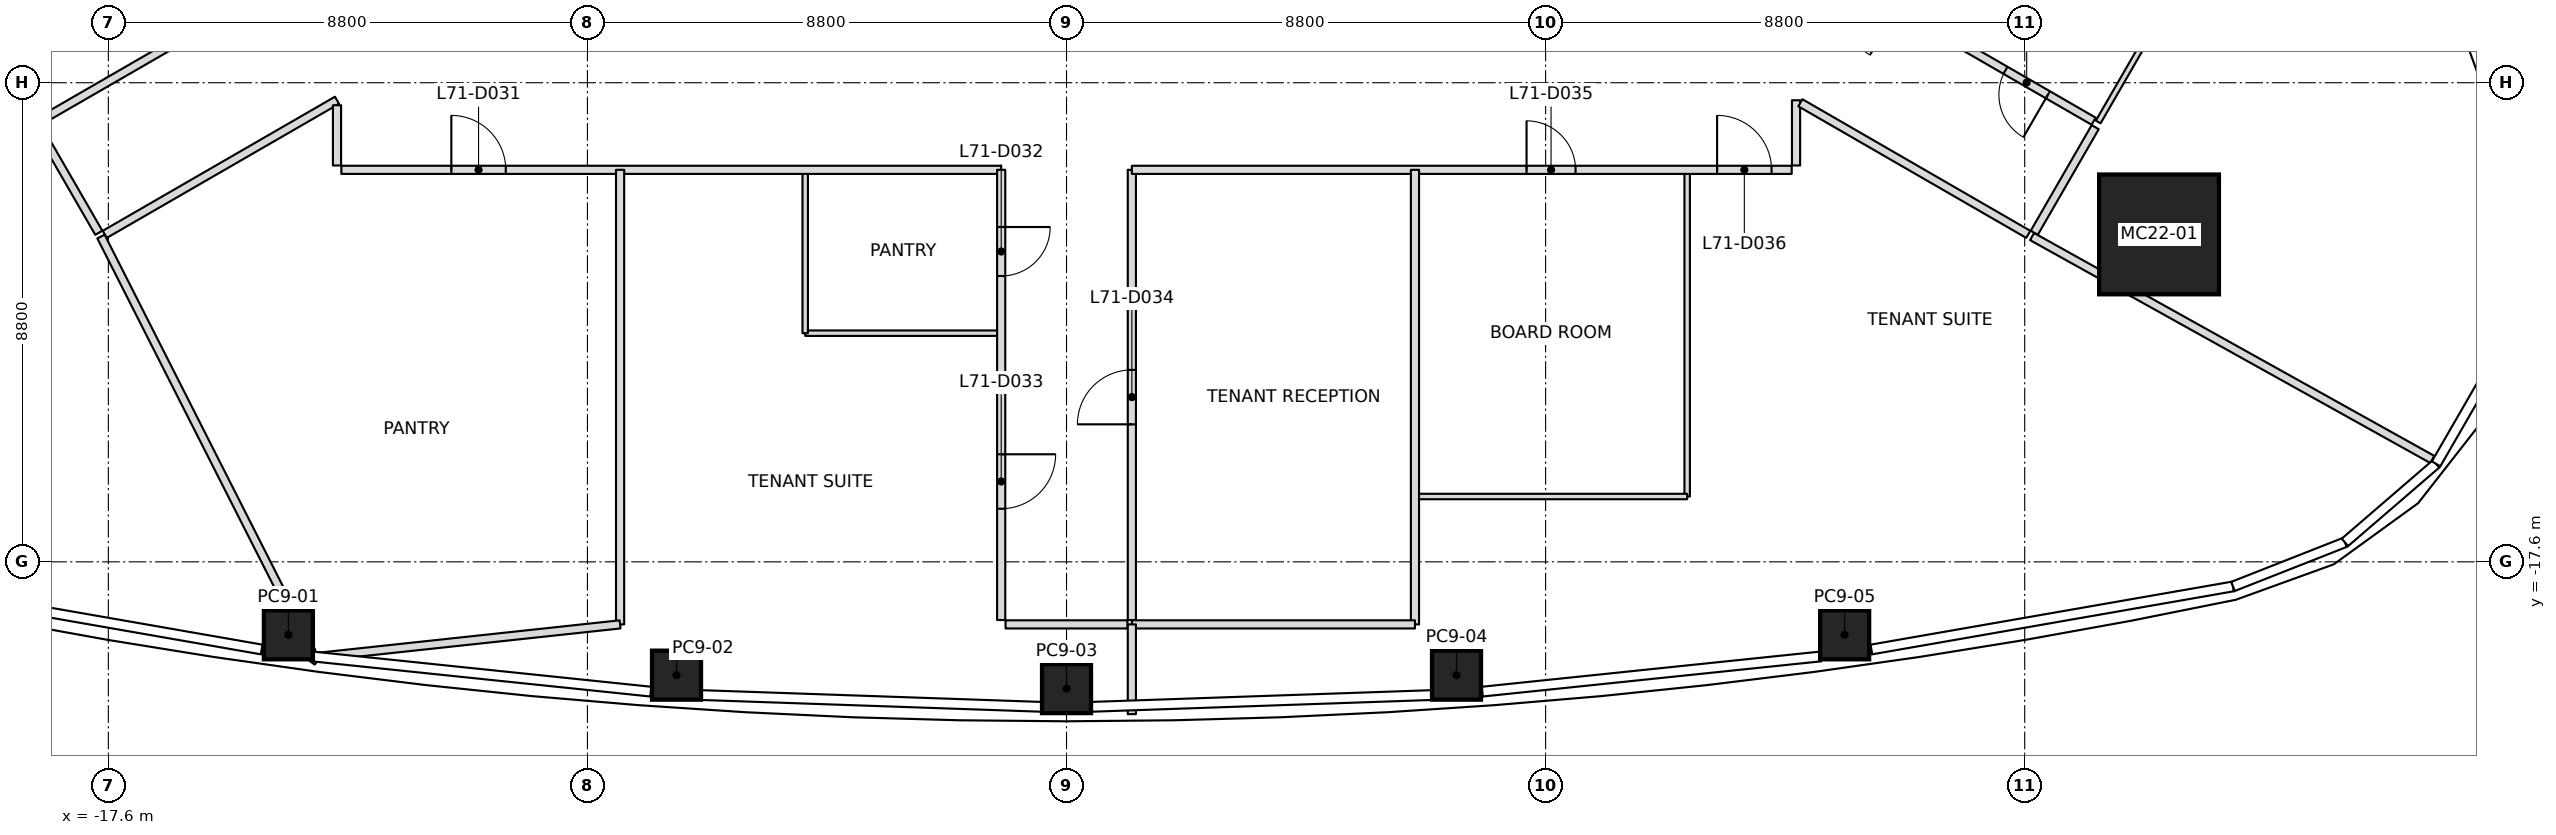
"""IFC4 building model, lengths in metres.
Left out: names, types, materials, properties, quantities, classifications, styles, units other than length and angle.
Written with IfcOpenShell. Run it as: python <this file> out.ifc"""

import sys

from ifc_helpers import new_model, si_unit, direction, frame, frame_2d, origin, origin_2d, place, context, subcontext, project, spatial, rectangle, extrude, element, fill, save


model = new_model("IFC4")
c1 = context("Model", 3, precision=1e-05, world=origin(), true_north=direction((0.0, 1.0)))
c2 = subcontext(c1, "Body", "Model", "MODEL_VIEW")
j1 = project(units=[si_unit("LENGTHUNIT", "METRE"), si_unit("PLANEANGLEUNIT", "RADIAN")], contexts=[c1])
p1 = place(None, origin())
s1 = spatial("IfcSite", under=j1, at=p1, CompositionType="ELEMENT")
p2 = place(p1, origin())
s2 = spatial("IfcBuilding", under=s1, at=p2, CompositionType="ELEMENT")
p3 = place(p2, frame((0.0, 0.0, 311.0)))
s3 = spatial("IfcBuildingStorey", under=s2, at=p3, CompositionType="ELEMENT", Elevation=311.0)
p4 = place(p3, frame((20.067, -11.586, 0.0), z_axis=(-0.027695790401, 0.015983033227, 0.999488612163), x_axis=(0.999616398022, 0.00044283261, 0.027692249912)))
e1 = element("IfcColumn", 1, at=p4, inside=s3, PredefinedType="COLUMN", context=c2, shape_type="SweptSolid", body=[
    extrude(rectangle(XDim=2.2, YDim=2.2, at=origin_2d()), origin(), (0.0, 0.0, 1.0), 4.002),
])
p5 = place(p3, frame((-14.293, -18.94, 0.0), z_axis=(0.017391452496, 0.010373848857, 0.999794939295), x_axis=(-0.990333494327, 0.137804297065, 0.01579701632)))
e2 = element("IfcColumn", 2, at=p5, inside=s3, PredefinedType="COLUMN", context=c2, shape_type="SweptSolid", body=[
    extrude(rectangle(XDim=0.9, YDim=0.9, at=origin_2d()), origin(), (0.0, 0.0, 1.0), 4.001),
])
p6 = place(p3, frame((-7.164, -19.681, 0.0), z_axis=(0.008727156526, 0.011107290124, 0.999900227445), x_axis=(-0.997580055995, 0.069072384326, 0.00793962244)))
e3 = element("IfcColumn", 3, at=p6, inside=s3, PredefinedType="COLUMN", context=c2, shape_type="SweptSolid", body=[
    extrude(rectangle(XDim=0.9, YDim=0.9, at=origin_2d()), origin(), (0.0, 0.0, 1.0), 4.0),
])
p7 = place(p3, frame((0.0, -19.929, 0.0), z_axis=(0.0, 0.011473854038, 0.99993417317), x_axis=(1.0, 0.0, 0.0)))
e4 = element("IfcColumn", 4, at=p7, inside=s3, PredefinedType="COLUMN", context=c2, shape_type="SweptSolid", body=[
    extrude(rectangle(XDim=0.9, YDim=0.9, at=origin_2d()), origin(), (0.0, 0.0, 1.0), 4.0),
])
p8 = place(p3, frame((7.164, -19.681, 0.0), z_axis=(-0.008727156526, 0.011107290124, 0.999900227445), x_axis=(0.997580055995, 0.069072384326, 0.00793962244)))
e5 = element("IfcColumn", 5, at=p8, inside=s3, PredefinedType="COLUMN", context=c2, shape_type="SweptSolid", body=[
    extrude(rectangle(XDim=0.9, YDim=0.9, at=origin_2d()), origin(), (0.0, 0.0, 1.0), 4.0),
])
p9 = place(p3, frame((14.293, -18.94, 0.0), z_axis=(-0.017391452496, 0.010373848857, 0.999794939295), x_axis=(0.990333494327, 0.137804297065, 0.01579701632)))
e6 = element("IfcColumn", 6, at=p9, inside=s3, PredefinedType="COLUMN", context=c2, shape_type="SweptSolid", body=[
    extrude(rectangle(XDim=0.9, YDim=0.9, at=origin_2d()), origin(), (0.0, 0.0, 1.0), 4.001),
])
p10 = place(p3, frame((-17.735, -11.625, 0.0), z_axis=(0.0, 0.0, 1.0), x_axis=(0.452377124292, -0.891826741815, 0.0)))
e7 = element("IfcWall", 7, at=p10, inside=s3, PredefinedType="PARTITIONING", context=c2, shape_type="SweptSolid", body=[
    extrude(rectangle(XDim=8.555, YDim=0.15, at=frame_2d((4.278, 0.0))), origin(), (0.0, 0.0, 1.0), 3.45),
])
p11 = place(p3, frame((-8.2, -10.4, 0.0), z_axis=(0.0, 0.0, 1.0), x_axis=(0.0, -1.0, 0.0)))
e8 = element("IfcWall", 8, at=p11, inside=s3, PredefinedType="PARTITIONING", context=c2, shape_type="SweptSolid", body=[
    extrude(rectangle(XDim=8.349, YDim=0.15, at=frame_2d((4.174, 0.0))), origin(), (0.0, 0.0, 1.0), 3.45),
])
p12 = place(p3, frame((-8.2, -18.749, 0.0), z_axis=(0.0, 0.0, 1.0), x_axis=(-0.994268787809, -0.106909202549, 0.0)))
e9 = element("IfcWall", 9, at=p12, inside=s3, PredefinedType="PARTITIONING", context=c2, shape_type="SweptSolid", body=[
    extrude(rectangle(XDim=5.547, YDim=0.15, at=frame_2d((2.773, 0.0))), origin(), (0.0, 0.0, 1.0), 3.234),
])
p13 = place(p3, frame((-13.765, -19.428, 0.0), z_axis=(0.0, 0.0, 1.0), x_axis=(-0.803180127116, 0.595736253225, 0.0)))
e10 = element("IfcWall", 10, at=p13, inside=s3, PredefinedType="PARTITIONING", context=c2, shape_type="SweptSolid", body=[
    extrude(rectangle(XDim=0.184, YDim=0.15, at=frame_2d((0.092, 0.0))), origin(), (0.0, 0.0, 1.0), 3.45),
])
p14 = place(p3, frame((6.4, -10.4, 0.0), z_axis=(0.0, 0.0, 1.0), x_axis=(0.0, -1.0, 0.0)))
e11 = element("IfcWall", 11, at=p14, inside=s3, PredefinedType="PARTITIONING", context=c2, shape_type="SweptSolid", body=[
    extrude(rectangle(XDim=8.349, YDim=0.15, at=frame_2d((4.174, 0.0))), origin(), (0.0, 0.0, 1.0), 3.45),
])
p15 = place(p3, frame((6.4, -18.749, 0.0), z_axis=(0.0, 0.0, 1.0), x_axis=(-1.0, 0.0, 0.0)))
e12 = element("IfcWall", 12, at=p15, inside=s3, PredefinedType="PARTITIONING", context=c2, shape_type="SweptSolid", body=[
    extrude(rectangle(XDim=5.2, YDim=0.15, at=frame_2d((2.6, 0.0))), origin(), (0.0, 0.0, 1.0), 3.393),
])
p16 = place(p3, frame((1.2, -18.749, 0.0), z_axis=(0.0, 0.0, 1.0), x_axis=(0.0, -1.0, 0.0)))
e13 = element("IfcWall", 13, at=p16, inside=s3, PredefinedType="PARTITIONING", context=c2, shape_type="SweptSolid", body=[
    extrude(rectangle(XDim=1.649, YDim=0.15, at=frame_2d((0.824, 0.0))), origin(), (0.0, 0.0, 1.0), 3.234),
])
p17 = place(p3, frame((17.735, -11.625, 0.0), z_axis=(0.0, 0.0, 1.0), x_axis=(0.873657303836, -0.486541792094, 0.0)))
e14 = element("IfcWall", 14, at=p17, inside=s3, PredefinedType="PARTITIONING", context=c2, shape_type="SweptSolid", body=[
    extrude(rectangle(XDim=8.415, YDim=0.15, at=frame_2d((4.208, 0.0))), origin(), (0.0, 0.0, 1.0), 3.234),
])
p18 = place(p3, frame((-18.896, -9.616, 0.0), z_axis=(0.0, 0.0, 1.0), x_axis=(0.500030632641, -0.866007717299, 0.0)))
e15 = element("IfcWall", 15, at=p18, inside=s3, PredefinedType="PARTITIONING", context=c2, shape_type="SweptSolid", body=[
    extrude(rectangle(XDim=2.24, YDim=0.15, at=frame_2d((1.12, 0.0))), origin(), (0.0, 0.0, 1.0), 3.233),
])
p19 = place(p3, frame((-13.4, -6.351, 0.0), z_axis=(0.0, 0.0, 1.0), x_axis=(-0.866040017224, -0.499974687925, 0.0)))
e16 = element("IfcWall", 16, at=p19, inside=s3, PredefinedType="PARTITIONING", context=c2, shape_type="SweptSolid", body=[
    extrude(rectangle(XDim=6.312, YDim=0.15, at=frame_2d((3.156, 0.0))), origin(), (0.0, 0.0, 1.0), 3.317),
])
p20 = place(p3, frame((-17.666, -11.585, 0.0), z_axis=(0.0, 0.0, 1.0), x_axis=(0.86601721881, 0.500014176524, 0.0)))
e17 = element("IfcWall", 17, at=p20, inside=s3, PredefinedType="PARTITIONING", context=c2, shape_type="SweptSolid", body=[
    extrude(rectangle(XDim=4.926, YDim=0.15, at=frame_2d((2.463, 0.0))), origin(), (0.0, 0.0, 1.0), 3.233),
])
p21 = place(p3, frame((-13.4, -9.214, 0.0), z_axis=(0.0, 0.0, 1.0), x_axis=(0.0, -1.0, 0.0)))
e18 = element("IfcWall", 18, at=p21, inside=s3, PredefinedType="PARTITIONING", context=c2, shape_type="SweptSolid", body=[
    extrude(rectangle(XDim=1.106, YDim=0.15, at=frame_2d((0.553, 0.0))), origin(), (0.0, 0.0, 1.0), 3.233),
])
p22 = place(p3, frame((-13.32, -10.4, 0.0), z_axis=(0.0, 0.0, 1.0), x_axis=(1.0, 0.0, 0.0)))
e19 = element("IfcWall", 19, at=p22, inside=s3, PredefinedType="PARTITIONING", context=c2, shape_type="SweptSolid", body=[
    extrude(rectangle(XDim=12.12, YDim=0.15, at=frame_2d((6.06, 0.0))), origin(), (0.0, 0.0, 1.0), 3.393),
])
p23 = place(p22, frame((2.02, 0.0, 0.0)))
e20 = element("IfcOpeningElement", 20, at=p23, cuts=e19, PredefinedType="OPENING", context=c2, shape_type="SweptSolid", body=[
    extrude(rectangle(XDim=1.0, YDim=2.1, at=frame_2d((0.5, 1.05))), frame((0.0, 0.075, 0.0), z_axis=(0.0, -1.0, 0.0), x_axis=(1.0, 0.0, 0.0)), (0.0, 0.0, 1.0), 0.15),
])
p24 = place(p3, frame((-1.2, -10.4, 0.0), z_axis=(0.0, 0.0, 1.0), x_axis=(0.0, -1.0, 0.0)))
e21 = element("IfcWall", 21, at=p24, inside=s3, PredefinedType="PARTITIONING", context=c2, shape_type="SweptSolid", body=[
    extrude(rectangle(XDim=8.269, YDim=0.15, at=frame_2d((4.134, 0.0))), origin(), (0.0, 0.0, 1.0), 3.45),
])
p25 = place(p24, frame((1.05, 0.0, 0.0)))
e22 = element("IfcOpeningElement", 22, at=p25, cuts=e21, PredefinedType="OPENING", context=c2, shape_type="SweptSolid", body=[
    extrude(rectangle(XDim=0.9, YDim=2.1, at=frame_2d((0.45, 1.05))), frame((0.0, 0.075, 0.0), z_axis=(0.0, -1.0, 0.0), x_axis=(1.0, 0.0, 0.0)), (0.0, 0.0, 1.0), 0.15),
])
p26 = place(p24, frame((5.224, 0.0, 0.0)))
e23 = element("IfcOpeningElement", 23, at=p26, cuts=e21, PredefinedType="OPENING", context=c2, shape_type="SweptSolid", body=[
    extrude(rectangle(XDim=1.0, YDim=2.1, at=frame_2d((0.5, 1.05))), frame((0.0, 0.075, 0.0), z_axis=(0.0, -1.0, 0.0), x_axis=(1.0, 0.0, 0.0)), (0.0, 0.0, 1.0), 0.15),
])
p27 = place(p3, frame((-1.12, -18.749, 0.0), z_axis=(0.0, 0.0, 1.0), x_axis=(1.0, 0.0, 0.0)))
e24 = element("IfcWall", 24, at=p27, inside=s3, PredefinedType="PARTITIONING", context=c2, shape_type="SweptSolid", body=[
    extrude(rectangle(XDim=2.24, YDim=0.15, at=frame_2d((1.12, 0.0))), origin(), (0.0, 0.0, 1.0), 3.45),
])
p28 = place(p3, frame((1.2, -18.669, 0.0), z_axis=(0.0, 0.0, 1.0), x_axis=(0.0, 1.0, 0.0)))
e25 = element("IfcWall", 25, at=p28, inside=s3, PredefinedType="PARTITIONING", context=c2, shape_type="SweptSolid", body=[
    extrude(rectangle(XDim=8.269, YDim=0.15, at=frame_2d((4.134, 0.0))), origin(), (0.0, 0.0, 1.0), 3.45),
])
p29 = place(p28, frame((3.594, 0.0, 0.0)))
e26 = element("IfcOpeningElement", 26, at=p29, cuts=e25, PredefinedType="OPENING", context=c2, shape_type="SweptSolid", body=[
    extrude(rectangle(XDim=1.0, YDim=2.1, at=frame_2d((0.5, 1.05))), frame((0.0, 0.075, 0.0), z_axis=(0.0, -1.0, 0.0), x_axis=(1.0, 0.0, 0.0)), (0.0, 0.0, 1.0), 0.15),
])
p30 = place(p3, frame((1.2, -10.4, 0.0), z_axis=(0.0, 0.0, 1.0), x_axis=(1.0, 0.0, 0.0)))
e27 = element("IfcWall", 27, at=p30, inside=s3, PredefinedType="PARTITIONING", context=c2, shape_type="SweptSolid", body=[
    extrude(rectangle(XDim=12.12, YDim=0.15, at=frame_2d((6.06, 0.0))), origin(), (0.0, 0.0, 1.0), 3.393),
])
p31 = place(p30, frame((7.25, 0.0, 0.0)))
e28 = element("IfcOpeningElement", 28, at=p31, cuts=e27, PredefinedType="OPENING", context=c2, shape_type="SweptSolid", body=[
    extrude(rectangle(XDim=0.9, YDim=2.1, at=frame_2d((0.45, 1.05))), frame((0.0, 0.075, 0.0), z_axis=(0.0, -1.0, 0.0), x_axis=(1.0, 0.0, 0.0)), (0.0, 0.0, 1.0), 0.15),
])
p32 = place(p30, frame((10.75, 0.0, 0.0)))
e29 = element("IfcOpeningElement", 29, at=p32, cuts=e27, PredefinedType="OPENING", context=c2, shape_type="SweptSolid", body=[
    extrude(rectangle(XDim=1.0, YDim=2.1, at=frame_2d((0.5, 1.05))), frame((0.0, 0.075, 0.0), z_axis=(0.0, -1.0, 0.0), x_axis=(1.0, 0.0, 0.0)), (0.0, 0.0, 1.0), 0.15),
])
p33 = place(p3, frame((13.4, -10.32, 0.0), z_axis=(0.0, 0.0, 1.0), x_axis=(0.0, 1.0, 0.0)))
e30 = element("IfcWall", 30, at=p33, inside=s3, PredefinedType="PARTITIONING", context=c2, shape_type="SweptSolid", body=[
    extrude(rectangle(XDim=1.198, YDim=0.15, at=frame_2d((0.599, 0.0))), origin(), (0.0, 0.0, 1.0), 3.233),
])
p34 = place(p3, frame((13.479, -9.168, 0.0), z_axis=(0.0, 0.0, 1.0), x_axis=(0.866024961331, -0.50000076635, 0.0)))
e31 = element("IfcWall", 31, at=p34, inside=s3, PredefinedType="PARTITIONING", context=c2, shape_type="SweptSolid", body=[
    extrude(rectangle(XDim=4.834, YDim=0.15, at=frame_2d((2.417, 0.0))), origin(), (0.0, 0.0, 1.0), 3.233),
])
p35 = place(p3, frame((18.866, -9.507, 0.0), z_axis=(0.0, 0.0, 1.0), x_axis=(-0.866040017224, 0.499974687925, 0.0)))
e32 = element("IfcWall", 32, at=p35, inside=s3, PredefinedType="PARTITIONING", context=c2, shape_type="SweptSolid", body=[
    extrude(rectangle(XDim=6.312, YDim=0.15, at=frame_2d((3.156, 0.0))), origin(), (0.0, 0.0, 1.0), 3.317),
])
p36 = place(p35, frame((0.97, 0.0, 0.0)))
e33 = element("IfcOpeningElement", 33, at=p36, cuts=e32, PredefinedType="OPENING", context=c2, shape_type="SweptSolid", body=[
    extrude(rectangle(XDim=0.9, YDim=2.1, at=frame_2d((0.45, 1.05))), frame((0.0, 0.075, 0.0), z_axis=(0.0, -1.0, 0.0), x_axis=(1.0, 0.0, 0.0)), (0.0, 0.0, 1.0), 0.15),
])
p37 = place(p35, frame((4.166, 0.0, 0.0)))
e34 = element("IfcOpeningElement", 34, at=p37, cuts=e32, PredefinedType="OPENING", context=c2, shape_type="SweptSolid", body=[
    extrude(rectangle(XDim=1.0, YDim=2.1, at=frame_2d((0.5, 1.05))), frame((0.0, 0.075, 0.0), z_axis=(0.0, -1.0, 0.0), x_axis=(1.0, 0.0, 0.0)), (0.0, 0.0, 1.0), 0.15),
])
p38 = place(p3, frame((17.775, -11.556, 0.0), z_axis=(0.0, 0.0, 1.0), x_axis=(0.500030632641, 0.866007717299, 0.0)))
e35 = element("IfcWall", 35, at=p38, inside=s3, PredefinedType="PARTITIONING", context=c2, shape_type="SweptSolid", body=[
    extrude(rectangle(XDim=2.24, YDim=0.15, at=frame_2d((1.12, 0.0))), origin(), (0.0, 0.0, 1.0), 3.233),
])
p39 = place(p3, frame((-1.23, -13.4, 0.0), z_axis=(0.0, 0.0, 1.0), x_axis=(-1.0, 0.0, 0.0)))
e36 = element("IfcWall", 36, at=p39, inside=s3, PredefinedType="PARTITIONING", context=c2, shape_type="SweptSolid", body=[
    extrude(rectangle(XDim=3.57, YDim=0.1, at=frame_2d((1.785, 0.0))), origin(), (0.0, 0.0, 1.0), 3.393),
])
p40 = place(p3, frame((-4.8, -13.4, 0.0), z_axis=(0.0, 0.0, 1.0), x_axis=(0.0, 1.0, 0.0)))
e37 = element("IfcWall", 37, at=p40, inside=s3, PredefinedType="PARTITIONING", context=c2, shape_type="SweptSolid", body=[
    extrude(rectangle(XDim=2.97, YDim=0.1, at=frame_2d((1.485, 0.0))), origin(), (0.0, 0.0, 1.0), 3.45),
])
p41 = place(p3, frame((11.4, -10.43, 0.0), z_axis=(0.0, 0.0, 1.0), x_axis=(0.0, -1.0, 0.0)))
e38 = element("IfcWall", 38, at=p41, inside=s3, PredefinedType="PARTITIONING", context=c2, shape_type="SweptSolid", body=[
    extrude(rectangle(XDim=5.97, YDim=0.1, at=frame_2d((2.985, 0.0))), origin(), (0.0, 0.0, 1.0), 3.45),
])
p42 = place(p3, frame((11.4, -16.4, 0.0), z_axis=(0.0, 0.0, 1.0), x_axis=(-1.0, 0.0, 0.0)))
e39 = element("IfcWall", 39, at=p42, inside=s3, PredefinedType="PARTITIONING", context=c2, shape_type="SweptSolid", body=[
    extrude(rectangle(XDim=4.97, YDim=0.1, at=frame_2d((2.485, 0.0))), origin(), (0.0, 0.0, 1.0), 3.393),
])
p43 = place(p3, frame((20.735, -6.429, 0.0), z_axis=(0.0, 0.0, 1.0), x_axis=(-0.499971082179, -0.866042098853, 0.0)))
e40 = element("IfcWall", 40, at=p43, inside=s3, PredefinedType="PARTITIONING", context=c2, shape_type="SweptSolid", body=[
    extrude(rectangle(XDim=3.57, YDim=0.1, at=frame_2d((1.785, 0.0))), origin(), (0.0, 0.0, 1.0), 3.45),
])
p44 = place(p23, origin())
e41 = element("IfcDoor", 41, at=p44, inside=s3, OperationType="SINGLE_SWING_LEFT", PredefinedType="DOOR", context=c2, shape_type="SweptSolid", body=[
    extrude(rectangle(XDim=1.0, YDim=2.1, at=frame_2d((0.5, 1.05))), frame((0.0, 0.025, 0.0), z_axis=(0.0, -1.0, 0.0), x_axis=(1.0, 0.0, 0.0)), (0.0, 0.0, 1.0), 0.05),
])
fill(e20, e41)
p45 = place(p25, origin())
e42 = element("IfcDoor", 42, at=p45, inside=s3, OperationType="SINGLE_SWING_LEFT", PredefinedType="DOOR", context=c2, shape_type="SweptSolid", body=[
    extrude(rectangle(XDim=0.9, YDim=2.1, at=frame_2d((0.45, 1.05))), frame((0.0, 0.025, 0.0), z_axis=(0.0, -1.0, 0.0), x_axis=(1.0, 0.0, 0.0)), (0.0, 0.0, 1.0), 0.05),
])
fill(e22, e42)
p46 = place(p26, origin())
e43 = element("IfcDoor", 43, at=p46, inside=s3, OperationType="SINGLE_SWING_RIGHT", PredefinedType="DOOR", context=c2, shape_type="SweptSolid", body=[
    extrude(rectangle(XDim=1.0, YDim=2.1, at=frame_2d((0.5, 1.05))), frame((0.0, 0.025, 0.0), z_axis=(0.0, -1.0, 0.0), x_axis=(1.0, 0.0, 0.0)), (0.0, 0.0, 1.0), 0.05),
])
fill(e23, e43)
p47 = place(p29, origin())
e44 = element("IfcDoor", 44, at=p47, inside=s3, OperationType="SINGLE_SWING_LEFT", PredefinedType="DOOR", context=c2, shape_type="SweptSolid", body=[
    extrude(rectangle(XDim=1.0, YDim=2.1, at=frame_2d((0.5, 1.05))), frame((0.0, 0.025, 0.0), z_axis=(0.0, -1.0, 0.0), x_axis=(1.0, 0.0, 0.0)), (0.0, 0.0, 1.0), 0.05),
])
fill(e26, e44)
p48 = place(p31, origin())
e45 = element("IfcDoor", 45, at=p48, inside=s3, OperationType="SINGLE_SWING_RIGHT", PredefinedType="DOOR", context=c2, shape_type="SweptSolid", body=[
    extrude(rectangle(XDim=0.9, YDim=2.1, at=frame_2d((0.45, 1.05))), frame((0.0, 0.025, 0.0), z_axis=(0.0, -1.0, 0.0), x_axis=(1.0, 0.0, 0.0)), (0.0, 0.0, 1.0), 0.05),
])
fill(e28, e45)
p49 = place(p32, origin())
e46 = element("IfcDoor", 46, at=p49, inside=s3, OperationType="SINGLE_SWING_RIGHT", PredefinedType="DOOR", context=c2, shape_type="SweptSolid", body=[
    extrude(rectangle(XDim=1.0, YDim=2.1, at=frame_2d((0.5, 1.05))), frame((0.0, 0.025, 0.0), z_axis=(0.0, -1.0, 0.0), x_axis=(1.0, 0.0, 0.0)), (0.0, 0.0, 1.0), 0.05),
])
fill(e29, e46)
p50 = place(p36, origin())
e47 = element("IfcDoor", 47, at=p50, inside=s3, OperationType="SINGLE_SWING_LEFT", PredefinedType="DOOR", context=c2, shape_type="SweptSolid", body=[
    extrude(rectangle(XDim=0.9, YDim=2.1, at=frame_2d((0.45, 1.05))), frame((0.0, 0.025, 0.0), z_axis=(0.0, -1.0, 0.0), x_axis=(1.0, 0.0, 0.0)), (0.0, 0.0, 1.0), 0.05),
])
fill(e33, e47)
save(model, sys.argv[1])
